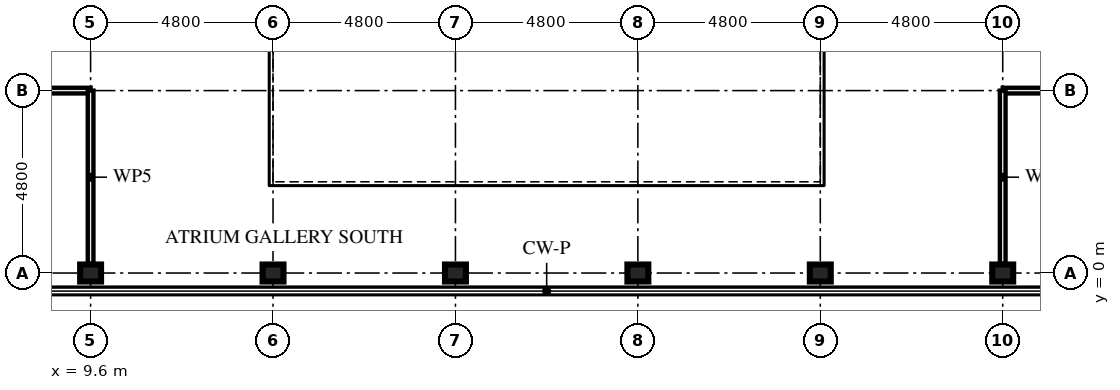
"""IFC4 building model, lengths in metres.
Left out: names, types, materials, properties, quantities, classifications, styles, units other than length and angle.
Written with IfcOpenShell. Run it as: python <this file> out.ifc"""

import sys

from ifc_helpers import new_model, si_unit, direction, frame, frame_2d, origin, origin_2d, place, context, subcontext, project, spatial, rectangle, i_section, extrude, element, save


model = new_model("IFC4")
c1 = context("Model", 3, precision=1e-05, world=origin(), true_north=direction((0.0, 1.0)))
c2 = subcontext(c1, "Body", "Model", "MODEL_VIEW")
j1 = project(units=[si_unit("LENGTHUNIT", "METRE"), si_unit("PLANEANGLEUNIT", "RADIAN")], contexts=[c1])
p1 = place(None, origin())
s1 = spatial("IfcSite", under=j1, at=p1, CompositionType="ELEMENT")
p2 = place(p1, origin())
s2 = spatial("IfcBuilding", under=s1, at=p2, CompositionType="ELEMENT")
p3 = place(p2, frame((0.0, 0.0, 9.0)))
s3 = spatial("IfcBuildingStorey", under=s2, at=p3, CompositionType="ELEMENT", Elevation=9.0)
for number, where, z_axis, x_axis in (
    (1, (9.6, 0.0, 0.0), (0.0, 0.0, 1.0), (0.0, 1.0, 0.0)),
    (2, (14.4, 0.0, 0.0), (0.0, 0.0, 1.0), (0.0, 1.0, 0.0)),
    (3, (19.2, 0.0, 0.0), (0.0, 0.0, 1.0), (0.0, 1.0, 0.0)),
    (4, (24.0, 0.0, 0.0), (0.0, 0.0, 1.0), (0.0, 1.0, 0.0)),
    (5, (28.8, 0.0, 0.0), (0.0, 0.0, 1.0), (0.0, 1.0, 0.0)),
    (6, (33.6, 0.0, 0.0), (0.0, 0.0, 1.0), (0.0, 1.0, 0.0)),
):
    element("IfcColumn", number, at=place(p3, frame(where, z_axis=z_axis, x_axis=x_axis)), inside=s3, PredefinedType="COLUMN", context=c2, shape_type="SweptSolid", body=[
        extrude(i_section(OverallWidth=0.448, OverallDepth=0.55, WebThickness=0.072, FlangeThickness=0.115, FilletRadius=0.015, at=origin_2d()), origin(), (0.0, 0.0, 1.0), 4.5),
    ])
p4 = place(p3, frame((-4.48, 4.8, 0.0), z_axis=(0.0, 0.0, 1.0), x_axis=(1.0, 0.0, 0.0)))
e7 = element("IfcWall", 7, at=p4, inside=s3, PredefinedType="PARTITIONING", context=c2, shape_type="SweptSolid", body=[
    extrude(rectangle(XDim=14.08, YDim=0.15, at=frame_2d((7.04, 0.0))), origin(), (0.0, 0.0, 1.0), 3.55),
])
p5 = place(p4, frame((8.78, 0.0, 0.0)))
e8 = element("IfcOpeningElement", 8, at=p5, cuts=e7, PredefinedType="OPENING", context=c2, shape_type="SweptSolid", body=[
    extrude(rectangle(XDim=1.0, YDim=2.4, at=frame_2d((0.5, 1.2))), frame((0.0, 0.085, 0.0), z_axis=(0.0, -1.0, 0.0), x_axis=(1.0, 0.0, 0.0)), (0.0, 0.0, 1.0), 0.171),
])
p6 = place(p3, frame((33.6, 4.8, 0.0), z_axis=(0.0, 0.0, 1.0), x_axis=(1.0, 0.0, 0.0)))
e9 = element("IfcWall", 9, at=p6, inside=s3, PredefinedType="PARTITIONING", context=c2, shape_type="SweptSolid", body=[
    extrude(rectangle(XDim=14.08, YDim=0.15, at=frame_2d((7.04, 0.0))), origin(), (0.0, 0.0, 1.0), 3.55),
])
p7 = place(p6, frame((4.3, 0.0, 0.0)))
e10 = element("IfcOpeningElement", 10, at=p7, cuts=e9, PredefinedType="OPENING", context=c2, shape_type="SweptSolid", body=[
    extrude(rectangle(XDim=1.0, YDim=2.4, at=frame_2d((0.5, 1.2))), frame((0.0, 0.085, 0.0), z_axis=(0.0, -1.0, 0.0), x_axis=(1.0, 0.0, 0.0)), (0.0, 0.0, 1.0), 0.171),
])
for number, where, z_axis, x_axis in (
    (11, (9.6, 0.244, 0.0), (0.0, 0.0, 1.0), (0.0, 1.0, 0.0)),
    (12, (33.6, 0.244, 0.0), (0.0, 0.0, 1.0), (0.0, 1.0, 0.0)),
):
    element("IfcWall", number, at=place(p3, frame(where, z_axis=z_axis, x_axis=x_axis)), inside=s3, PredefinedType="PARTITIONING", context=c2, shape_type="SweptSolid", body=[
        extrude(rectangle(XDim=4.556, YDim=0.15, at=frame_2d((2.278, 0.0))), origin(), (0.0, 0.0, 1.0), 3.55),
    ])
save(model, sys.argv[1])
